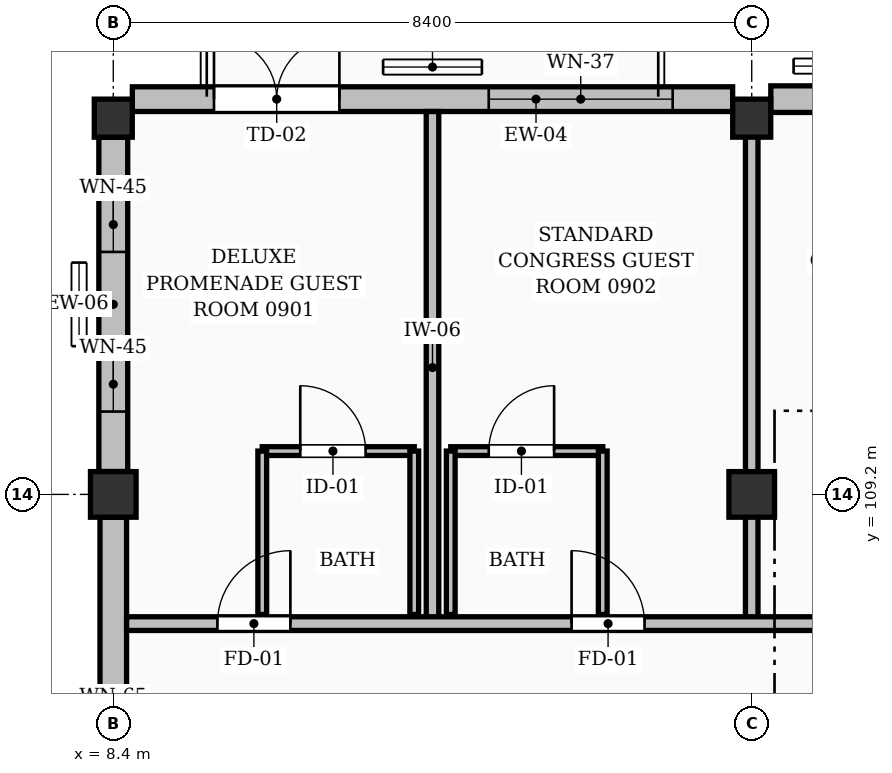
"""IFC4 building model, lengths in metres.
Left out: names, types, materials, properties, quantities, classifications, styles, units other than length and angle.
Written with IfcOpenShell. Run it as: python <this file> out.ifc"""

import sys

from ifc_helpers import new_model, si_unit, direction, frame, frame_2d, origin, origin_2d, place, context, subcontext, project, spatial, rectangle, extrude, element, fill, save


model = new_model("IFC4")
c1 = context("Model", 3, precision=1e-05, world=origin(), true_north=direction((0.0, 1.0)))
c2 = subcontext(c1, "Body", "Model", "MODEL_VIEW")
j1 = project(units=[si_unit("LENGTHUNIT", "METRE"), si_unit("PLANEANGLEUNIT", "RADIAN")], contexts=[c1])
p1 = place(None, origin())
s1 = spatial("IfcSite", under=j1, at=p1, CompositionType="ELEMENT")
p2 = place(p1, origin())
s2 = spatial("IfcBuilding", under=s1, at=p2, CompositionType="ELEMENT")
p3 = place(p2, frame((0.0, 0.0, 31.92)))
s3 = spatial("IfcBuildingStorey", under=s2, at=p3, CompositionType="ELEMENT", Elevation=31.92)
p4 = place(p3, frame((8.4, 109.2, 0.0), z_axis=(0.0, 0.0, 1.0), x_axis=(1.0, 0.0, 0.0)))
e1 = element("IfcColumn", 1, at=p4, inside=s3, PredefinedType="COLUMN", context=c2, shape_type="SweptSolid", body=[
    extrude(rectangle(XDim=0.6, YDim=0.6, at=origin_2d()), origin(), (0.0, 0.0, 1.0), 3.36),
])
p5 = place(p3, frame((8.4, 114.15, 0.0), z_axis=(0.0, 0.0, 1.0), x_axis=(1.0, 0.0, 0.0)))
e2 = element("IfcColumn", 2, at=p5, inside=s3, PredefinedType="COLUMN", context=c2, shape_type="SweptSolid", body=[
    extrude(rectangle(XDim=0.5, YDim=0.5, at=origin_2d()), origin(), (0.0, 0.0, 1.0), 3.36),
])
p6 = place(p3, frame((16.8, 109.2, 0.0), z_axis=(0.0, 0.0, 1.0), x_axis=(1.0, 0.0, 0.0)))
e3 = element("IfcColumn", 3, at=p6, inside=s3, PredefinedType="COLUMN", context=c2, shape_type="SweptSolid", body=[
    extrude(rectangle(XDim=0.6, YDim=0.6, at=origin_2d()), origin(), (0.0, 0.0, 1.0), 3.36),
])
p7 = place(p3, frame((16.8, 114.15, 0.0), z_axis=(0.0, 0.0, 1.0), x_axis=(1.0, 0.0, 0.0)))
e4 = element("IfcColumn", 4, at=p7, inside=s3, PredefinedType="COLUMN", context=c2, shape_type="SweptSolid", body=[
    extrude(rectangle(XDim=0.5, YDim=0.5, at=origin_2d()), origin(), (0.0, 0.0, 1.0), 3.36),
])
p8 = place(p3, frame((8.651, 114.4, 0.0), z_axis=(0.0, 0.0, 1.0), x_axis=(1.0, 0.0, 0.0)))
e5 = element("IfcWall", 5, at=p8, inside=s3, PredefinedType="SOLIDWALL", context=c2, shape_type="SweptSolid", body=[
    extrude(rectangle(XDim=7.898, YDim=0.325, at=frame_2d((3.949, 0.0))), origin(), (0.0, 0.0, 1.0), 2.474),
])
p9 = place(p8, frame((1.074, 0.0, 0.0)))
e6 = element("IfcOpeningElement", 6, at=p9, cuts=e5, PredefinedType="OPENING", context=c2, shape_type="SweptSolid", body=[
    extrude(rectangle(XDim=1.65, YDim=2.08, at=frame_2d((0.825, 1.04))), frame((0.0, 0.172, 0.0), z_axis=(0.0, -1.0, 0.0), x_axis=(1.0, 0.0, 0.0)), (0.0, 0.0, 1.0), 0.345),
])
p10 = place(p8, frame((4.689, 0.0, 0.25)))
e7 = element("IfcOpeningElement", 7, at=p10, cuts=e5, PredefinedType="OPENING", context=c2, shape_type="SweptSolid", body=[
    extrude(rectangle(XDim=2.42, YDim=1.9, at=frame_2d((1.21, 0.95))), frame((0.0, 0.172, 0.0), z_axis=(0.0, -1.0, 0.0), x_axis=(1.0, 0.0, 0.0)), (0.0, 0.0, 1.0), 0.345),
])
p11 = place(p3, frame((17.051, 114.4, 0.0), z_axis=(0.0, 0.0, 1.0), x_axis=(1.0, 0.0, 0.0)))
e8 = element("IfcWall", 8, at=p11, inside=s3, PredefinedType="SOLIDWALL", context=c2, shape_type="SweptSolid", body=[
    extrude(rectangle(XDim=7.898, YDim=0.35, at=frame_2d((3.949, 0.0))), origin(), (0.0, 0.0, 1.0), 2.474),
])
p12 = place(p11, frame((0.709, 0.0, 0.25)))
e9 = element("IfcOpeningElement", 9, at=p12, cuts=e8, PredefinedType="OPENING", context=c2, shape_type="SweptSolid", body=[
    extrude(rectangle(XDim=2.28, YDim=2.0, at=frame_2d((1.14, 1.0))), frame((0.0, 0.185, 0.0), z_axis=(0.0, -1.0, 0.0), x_axis=(1.0, 0.0, 0.0)), (0.0, 0.0, 1.0), 0.37),
])
p13 = place(p11, frame((4.924, 0.0, 0.25)))
e10 = element("IfcOpeningElement", 10, at=p13, cuts=e8, PredefinedType="OPENING", context=c2, shape_type="SweptSolid", body=[
    extrude(rectangle(XDim=2.25, YDim=1.85, at=frame_2d((1.125, 0.925))), frame((0.0, 0.185, 0.0), z_axis=(0.0, -1.0, 0.0), x_axis=(1.0, 0.0, 0.0)), (0.0, 0.0, 1.0), 0.37),
])
p14 = place(p3, frame((8.4, 101.101, 0.0), z_axis=(0.0, 0.0, 1.0), x_axis=(0.0, 1.0, 0.0)))
e11 = element("IfcWall", 11, at=p14, inside=s3, PredefinedType="SOLIDWALL", context=c2, shape_type="SweptSolid", body=[
    extrude(rectangle(XDim=7.798, YDim=0.35, at=frame_2d((3.899, 0.0))), origin(), (0.0, 0.0, 1.0), 2.474),
])
p15 = place(p14, frame((2.499, 0.0, 0.3)))
e12 = element("IfcOpeningElement", 12, at=p15, cuts=e11, PredefinedType="OPENING", context=c2, shape_type="SweptSolid", body=[
    extrude(rectangle(XDim=0.7, YDim=1.9, at=frame_2d((0.35, 0.95))), frame((0.0, 0.185, 0.0), z_axis=(0.0, -1.0, 0.0), x_axis=(1.0, 0.0, 0.0)), (0.0, 0.0, 1.0), 0.37),
])
p16 = place(p14, frame((4.599, 0.0, 0.3)))
e13 = element("IfcOpeningElement", 13, at=p16, cuts=e11, PredefinedType="OPENING", context=c2, shape_type="SweptSolid", body=[
    extrude(rectangle(XDim=0.7, YDim=1.9, at=frame_2d((0.35, 0.95))), frame((0.0, 0.185, 0.0), z_axis=(0.0, -1.0, 0.0), x_axis=(1.0, 0.0, 0.0)), (0.0, 0.0, 1.0), 0.37),
])
p17 = place(p3, frame((8.4, 109.501, 0.0), z_axis=(0.0, 0.0, 1.0), x_axis=(0.0, 1.0, 0.0)))
e14 = element("IfcWall", 14, at=p17, inside=s3, PredefinedType="SOLIDWALL", context=c2, shape_type="SweptSolid", body=[
    extrude(rectangle(XDim=4.398, YDim=0.38, at=frame_2d((2.199, 0.0))), origin(), (0.0, 0.0, 1.0), 2.39),
])
p18 = place(p17, frame((0.789, 0.0, 0.3)))
e15 = element("IfcOpeningElement", 15, at=p18, cuts=e14, PredefinedType="OPENING", context=c2, shape_type="SweptSolid", body=[
    extrude(rectangle(XDim=0.72, YDim=1.85, at=frame_2d((0.36, 0.925))), frame((0.0, 0.2, 0.0), z_axis=(0.0, -1.0, 0.0), x_axis=(1.0, 0.0, 0.0)), (0.0, 0.0, 1.0), 0.4),
])
p19 = place(p17, frame((2.889, 0.0, 0.3)))
e16 = element("IfcOpeningElement", 16, at=p19, cuts=e14, PredefinedType="OPENING", context=c2, shape_type="SweptSolid", body=[
    extrude(rectangle(XDim=0.72, YDim=1.85, at=frame_2d((0.36, 0.925))), frame((0.0, 0.2, 0.0), z_axis=(0.0, -1.0, 0.0), x_axis=(1.0, 0.0, 0.0)), (0.0, 0.0, 1.0), 0.4),
])
p20 = place(p3, frame((10.36, 109.77, 0.0), z_axis=(0.0, 0.0, 1.0), x_axis=(1.0, 0.0, 0.0)))
e17 = element("IfcWall", 17, at=p20, inside=s3, PredefinedType="PARTITIONING", context=c2, shape_type="SweptSolid", body=[
    extrude(rectangle(XDim=2.0, YDim=0.115, at=frame_2d((1.0, 0.0))), origin(), (0.0, 0.0, 1.0), 3.1),
])
p21 = place(p20, frame((0.5, 0.0, 0.0)))
e18 = element("IfcOpeningElement", 18, at=p21, cuts=e17, PredefinedType="OPENING", context=c2, shape_type="SweptSolid", body=[
    extrude(rectangle(XDim=0.86, YDim=2.05, at=frame_2d((0.43, 1.025))), frame((0.0, 0.067, 0.0), z_axis=(0.0, -1.0, 0.0), x_axis=(1.0, 0.0, 0.0)), (0.0, 0.0, 1.0), 0.135),
])
for number, where, z_axis, x_axis in (
    (19, (10.36, 107.62, 0.0), (0.0, 0.0, 1.0), (0.0, 1.0, 0.0)),
    (20, (12.36, 107.62, 0.0), (0.0, 0.0, 1.0), (0.0, 1.0, 0.0)),
):
    element("IfcWall", number, at=place(p3, frame(where, z_axis=z_axis, x_axis=x_axis)), inside=s3, PredefinedType="PARTITIONING", context=c2, shape_type="SweptSolid", body=[
        extrude(rectangle(XDim=2.15, YDim=0.115, at=frame_2d((1.075, 0.0))), origin(), (0.0, 0.0, 1.0), 3.1),
    ])
p22 = place(p3, frame((12.84, 109.77, 0.0), z_axis=(0.0, 0.0, 1.0), x_axis=(1.0, 0.0, 0.0)))
e21 = element("IfcWall", 21, at=p22, inside=s3, PredefinedType="PARTITIONING", context=c2, shape_type="SweptSolid", body=[
    extrude(rectangle(XDim=2.0, YDim=0.115, at=frame_2d((1.0, 0.0))), origin(), (0.0, 0.0, 1.0), 3.1),
])
p23 = place(p22, frame((0.5, 0.0, 0.0)))
e22 = element("IfcOpeningElement", 22, at=p23, cuts=e21, PredefinedType="OPENING", context=c2, shape_type="SweptSolid", body=[
    extrude(rectangle(XDim=0.86, YDim=2.05, at=frame_2d((0.43, 1.025))), frame((0.0, 0.067, 0.0), z_axis=(0.0, -1.0, 0.0), x_axis=(1.0, 0.0, 0.0)), (0.0, 0.0, 1.0), 0.135),
])
for number, where, z_axis, x_axis in (
    (23, (12.84, 107.62, 0.0), (0.0, 0.0, 1.0), (0.0, 1.0, 0.0)),
    (24, (14.84, 107.62, 0.0), (0.0, 0.0, 1.0), (0.0, 1.0, 0.0)),
):
    element("IfcWall", number, at=place(p3, frame(where, z_axis=z_axis, x_axis=x_axis)), inside=s3, PredefinedType="PARTITIONING", context=c2, shape_type="SweptSolid", body=[
        extrude(rectangle(XDim=2.15, YDim=0.115, at=frame_2d((1.075, 0.0))), origin(), (0.0, 0.0, 1.0), 3.1),
    ])
p24 = place(p3, frame((12.6, 107.5, 0.0), z_axis=(0.0, 0.0, 1.0), x_axis=(0.0, 1.0, 0.0)))
e25 = element("IfcWall", 25, at=p24, inside=s3, PredefinedType="PARTITIONING", context=c2, shape_type="SweptSolid", body=[
    extrude(rectangle(XDim=6.738, YDim=0.165, at=frame_2d((3.369, 0.0))), origin(), (0.0, 0.0, 1.0), 3.1),
])
p25 = place(p3, frame((16.8, 107.5, 0.0), z_axis=(0.0, 0.0, 1.0), x_axis=(0.0, 1.0, 0.0)))
e26 = element("IfcWall", 26, at=p25, inside=s3, PredefinedType="PARTITIONING", context=c2, shape_type="SweptSolid", body=[
    extrude(rectangle(XDim=6.55, YDim=0.165, at=frame_2d((3.275, 0.0))), origin(), (0.0, 0.0, 1.0), 2.39),
])
p26 = place(p3, frame((8.575, 107.5, 0.0), z_axis=(0.0, 0.0, 1.0), x_axis=(1.0, 0.0, 0.0)))
e27 = element("IfcWall", 27, at=p26, inside=s3, PredefinedType="PARTITIONING", context=c2, shape_type="SweptSolid", body=[
    extrude(rectangle(XDim=25.795, YDim=0.18, at=frame_2d((12.897, 0.0))), origin(), (0.0, 0.0, 1.0), 3.1),
])
p27 = place(p26, frame((1.195, 0.0, 0.0)))
e28 = element("IfcOpeningElement", 28, at=p27, cuts=e27, PredefinedType="OPENING", context=c2, shape_type="SweptSolid", body=[
    extrude(rectangle(XDim=0.96, YDim=2.15, at=frame_2d((0.48, 1.075))), frame((0.0, 0.1, 0.0), z_axis=(0.0, -1.0, 0.0), x_axis=(1.0, 0.0, 0.0)), (0.0, 0.0, 1.0), 0.2),
])
p28 = place(p26, frame((5.855, 0.0, 0.0)))
e29 = element("IfcOpeningElement", 29, at=p28, cuts=e27, PredefinedType="OPENING", context=c2, shape_type="SweptSolid", body=[
    extrude(rectangle(XDim=0.96, YDim=2.15, at=frame_2d((0.48, 1.075))), frame((0.0, 0.1, 0.0), z_axis=(0.0, -1.0, 0.0), x_axis=(1.0, 0.0, 0.0)), (0.0, 0.0, 1.0), 0.2),
])
p29 = place(p26, frame((9.595, 0.0, 0.0)))
e30 = element("IfcOpeningElement", 30, at=p29, cuts=e27, PredefinedType="OPENING", context=c2, shape_type="SweptSolid", body=[
    extrude(rectangle(XDim=0.96, YDim=2.15, at=frame_2d((0.48, 1.075))), frame((0.0, 0.1, 0.0), z_axis=(0.0, -1.0, 0.0), x_axis=(1.0, 0.0, 0.0)), (0.0, 0.0, 1.0), 0.2),
])
p30 = place(p26, frame((14.255, 0.0, 0.0)))
e31 = element("IfcOpeningElement", 31, at=p30, cuts=e27, PredefinedType="OPENING", context=c2, shape_type="SweptSolid", body=[
    extrude(rectangle(XDim=0.96, YDim=2.15, at=frame_2d((0.48, 1.075))), frame((0.0, 0.1, 0.0), z_axis=(0.0, -1.0, 0.0), x_axis=(1.0, 0.0, 0.0)), (0.0, 0.0, 1.0), 0.2),
])
p31 = place(p26, frame((17.995, 0.0, 0.0)))
e32 = element("IfcOpeningElement", 32, at=p31, cuts=e27, PredefinedType="OPENING", context=c2, shape_type="SweptSolid", body=[
    extrude(rectangle(XDim=0.96, YDim=2.15, at=frame_2d((0.48, 1.075))), frame((0.0, 0.1, 0.0), z_axis=(0.0, -1.0, 0.0), x_axis=(1.0, 0.0, 0.0)), (0.0, 0.0, 1.0), 0.2),
])
p32 = place(p26, frame((22.655, 0.0, 0.0)))
e33 = element("IfcOpeningElement", 33, at=p32, cuts=e27, PredefinedType="OPENING", context=c2, shape_type="SweptSolid", body=[
    extrude(rectangle(XDim=0.96, YDim=2.15, at=frame_2d((0.48, 1.075))), frame((0.0, 0.1, 0.0), z_axis=(0.0, -1.0, 0.0), x_axis=(1.0, 0.0, 0.0)), (0.0, 0.0, 1.0), 0.2),
])
p33 = place(p9, origin())
e34 = element("IfcDoor", 34, at=p33, inside=s3, OperationType="DOUBLE_DOOR_SINGLE_SWING", PredefinedType="DOOR", context=c2, shape_type="SweptSolid", body=[
    extrude(rectangle(XDim=1.65, YDim=2.08, at=frame_2d((0.825, 1.04))), frame((0.0, 0.025, 0.0), z_axis=(0.0, -1.0, 0.0), x_axis=(1.0, 0.0, 0.0)), (0.0, 0.0, 1.0), 0.05),
])
fill(e6, e34)
p34 = place(p10, origin())
e35 = element("IfcWindow", 35, at=p34, inside=s3, PartitioningType="DOUBLE_PANEL_VERTICAL", PredefinedType="WINDOW", context=c2, shape_type="SweptSolid", body=[
    extrude(rectangle(XDim=2.42, YDim=1.9, at=frame_2d((1.21, 0.95))), frame((0.0, 0.03, 0.0), z_axis=(0.0, -1.0, 0.0), x_axis=(1.0, 0.0, 0.0)), (0.0, 0.0, 1.0), 0.06),
])
fill(e7, e35)
p35 = place(p18, origin())
e36 = element("IfcWindow", 36, at=p35, inside=s3, PartitioningType="SINGLE_PANEL", PredefinedType="WINDOW", context=c2, shape_type="SweptSolid", body=[
    extrude(rectangle(XDim=0.72, YDim=1.85, at=frame_2d((0.36, 0.925))), frame((0.0, 0.03, 0.0), z_axis=(0.0, -1.0, 0.0), x_axis=(1.0, 0.0, 0.0)), (0.0, 0.0, 1.0), 0.06),
])
fill(e15, e36)
p36 = place(p19, origin())
e37 = element("IfcWindow", 37, at=p36, inside=s3, PartitioningType="SINGLE_PANEL", PredefinedType="WINDOW", context=c2, shape_type="SweptSolid", body=[
    extrude(rectangle(XDim=0.72, YDim=1.85, at=frame_2d((0.36, 0.925))), frame((0.0, 0.03, 0.0), z_axis=(0.0, -1.0, 0.0), x_axis=(1.0, 0.0, 0.0)), (0.0, 0.0, 1.0), 0.06),
])
fill(e16, e37)
p37 = place(p21, origin())
e38 = element("IfcDoor", 38, at=p37, inside=s3, OperationType="SINGLE_SWING_LEFT", PredefinedType="DOOR", context=c2, shape_type="SweptSolid", body=[
    extrude(rectangle(XDim=0.86, YDim=2.05, at=frame_2d((0.43, 1.025))), frame((0.0, 0.025, 0.0), z_axis=(0.0, -1.0, 0.0), x_axis=(1.0, 0.0, 0.0)), (0.0, 0.0, 1.0), 0.05),
])
fill(e18, e38)
p38 = place(p23, origin())
e39 = element("IfcDoor", 39, at=p38, inside=s3, OperationType="SINGLE_SWING_RIGHT", PredefinedType="DOOR", context=c2, shape_type="SweptSolid", body=[
    extrude(rectangle(XDim=0.86, YDim=2.05, at=frame_2d((0.43, 1.025))), frame((0.0, 0.025, 0.0), z_axis=(0.0, -1.0, 0.0), x_axis=(1.0, 0.0, 0.0)), (0.0, 0.0, 1.0), 0.05),
])
fill(e22, e39)
p39 = place(p27, origin())
e40 = element("IfcDoor", 40, at=p39, inside=s3, OperationType="SINGLE_SWING_RIGHT", PredefinedType="DOOR", context=c2, shape_type="SweptSolid", body=[
    extrude(rectangle(XDim=0.96, YDim=2.15, at=frame_2d((0.48, 1.075))), frame((0.0, 0.025, 0.0), z_axis=(0.0, -1.0, 0.0), x_axis=(1.0, 0.0, 0.0)), (0.0, 0.0, 1.0), 0.05),
])
fill(e28, e40)
p40 = place(p28, origin())
e41 = element("IfcDoor", 41, at=p40, inside=s3, OperationType="SINGLE_SWING_LEFT", PredefinedType="DOOR", context=c2, shape_type="SweptSolid", body=[
    extrude(rectangle(XDim=0.96, YDim=2.15, at=frame_2d((0.48, 1.075))), frame((0.0, 0.025, 0.0), z_axis=(0.0, -1.0, 0.0), x_axis=(1.0, 0.0, 0.0)), (0.0, 0.0, 1.0), 0.05),
])
fill(e29, e41)
save(model, sys.argv[1])
